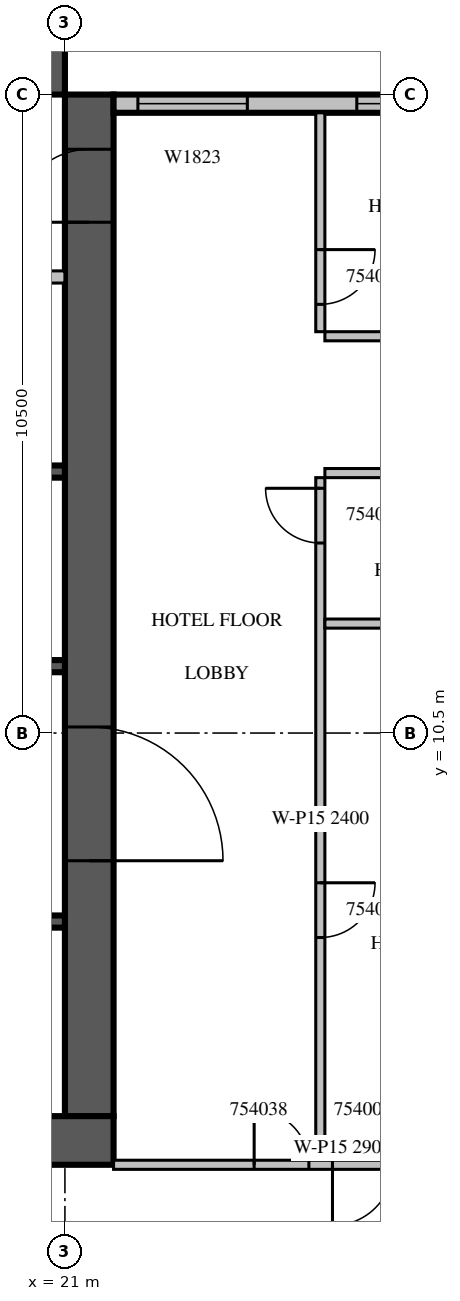
"""IFC4 building model, lengths in metres.
Left out: names, types, materials, properties, quantities, classifications, styles, units other than length and angle.
Written with IfcOpenShell. Run it as: python <this file> out.ifc"""

import sys

from ifc_helpers import new_model, si_unit, direction, frame, frame_2d, origin, place, context, subcontext, project, spatial, rectangle, extrude, source, transform, mapped, element, fill, save


model = new_model("IFC4")
c1 = context("Model", 3, precision=1e-05, world=origin(), true_north=direction((0.0, 1.0)))
c2 = subcontext(c1, "Body", "Model", "MODEL_VIEW")
j1 = project(units=[si_unit("LENGTHUNIT", "METRE"), si_unit("PLANEANGLEUNIT", "RADIAN")], contexts=[c1])
p1 = place(None, origin())
s1 = spatial("IfcSite", under=j1, at=p1, CompositionType="ELEMENT")
p2 = place(p1, origin())
s2 = spatial("IfcBuilding", under=s1, at=p2, CompositionType="ELEMENT")
p3 = place(p2, frame((0.0, 0.0, 238.6)))
s3 = spatial("IfcBuildingStorey", under=s2, at=p3, CompositionType="ELEMENT", Elevation=238.6)
m1 = source(origin(), c2, "Body", "SweptSolid", [
    extrude(rectangle(XDim=16.8, YDim=0.8, at=frame_2d((8.4, 0.0))), origin(), (0.0, 0.0, 1.0), 3.8),
])
p4 = place(p3, frame((21.4, 4.2, 0.0), z_axis=(0.0, 0.0, 1.0), x_axis=(0.0, 1.0, 0.0)))
e1 = element("IfcWall", 1, at=p4, inside=s3, PredefinedType="SHEAR", context=c2, shape_type="MappedRepresentation", body=[
    mapped(m1, transform((0.0, 0.0, 0.0), scale=1.0)),
])
m2 = source(origin(), c2, "Body", "SweptSolid", [
    extrude(rectangle(XDim=2.2, YDim=2.1, at=frame_2d((1.1, 1.05))), frame((0.0, 0.41, 0.0), z_axis=(0.0, -1.0, 0.0), x_axis=(1.0, 0.0, 0.0)), (0.0, 0.0, 1.0), 0.82),
])
p5 = place(p4, frame((4.2, 0.0, 0.0)))
e2 = element("IfcOpeningElement", 2, at=p5, cuts=e1, PredefinedType="OPENING", context=c2, shape_type="MappedRepresentation", body=[
    mapped(m2, transform((0.0, 0.0, 0.0), scale=1.0)),
])
m3 = source(origin(), c2, "Body", "SweptSolid", [
    extrude(rectangle(XDim=1.2, YDim=2.1, at=frame_2d((0.6, 1.05))), frame((0.0, 0.41, 0.0), z_axis=(0.0, -1.0, 0.0), x_axis=(1.0, 0.0, 0.0)), (0.0, 0.0, 1.0), 0.82),
])
p6 = place(p4, frame((14.7, 0.0, 0.0)))
e3 = element("IfcOpeningElement", 3, at=p6, cuts=e1, PredefinedType="OPENING", context=c2, shape_type="MappedRepresentation", body=[
    mapped(m3, transform((0.0, 0.0, 0.0), scale=1.0)),
])
m4 = source(origin(), c2, "Body", "SweptSolid", [
    extrude(rectangle(XDim=17.6, YDim=0.8, at=frame_2d((8.8, 0.0))), origin(), (0.0, 0.0, 1.0), 3.8),
])
p7 = place(p3, frame((4.2, 3.8, 0.0), z_axis=(0.0, 0.0, 1.0), x_axis=(1.0, 0.0, 0.0)))
e4 = element("IfcWall", 4, at=p7, inside=s3, PredefinedType="SHEAR", context=c2, shape_type="MappedRepresentation", body=[
    mapped(m4, transform((0.0, 0.0, 0.0), scale=1.0)),
])
m5 = source(origin(), c2, "Body", "SweptSolid", [
    extrude(rectangle(XDim=0.9, YDim=2.1, at=frame_2d((0.45, 1.05))), frame((0.0, 0.41, 0.0), z_axis=(0.0, -1.0, 0.0), x_axis=(1.0, 0.0, 0.0)), (0.0, 0.0, 1.0), 0.82),
])
p8 = place(p7, frame((12.75, 0.0, 0.0)))
e5 = element("IfcOpeningElement", 5, at=p8, cuts=e4, PredefinedType="OPENING", context=c2, shape_type="MappedRepresentation", body=[
    mapped(m5, transform((0.0, 0.0, 0.0), scale=1.0)),
])
p9 = place(p3, frame((4.2, 21.4, 0.0), z_axis=(0.0, 0.0, 1.0), x_axis=(1.0, 0.0, 0.0)))
e6 = element("IfcWall", 6, at=p9, inside=s3, PredefinedType="SHEAR", context=c2, shape_type="MappedRepresentation", body=[
    mapped(m1, transform((0.0, 0.0, 0.0), scale=1.0)),
])
p10 = place(p9, frame((7.4, 0.0, 0.0)))
e7 = element("IfcOpeningElement", 7, at=p10, cuts=e6, PredefinedType="OPENING", context=c2, shape_type="MappedRepresentation", body=[
    mapped(m3, transform((0.0, 0.0, 0.0), scale=1.0)),
])
m6 = source(origin(), c2, "Body", "SweptSolid", [
    extrude(rectangle(XDim=7.2, YDim=0.3, at=frame_2d((3.6, 0.0))), origin(), (0.0, 0.0, 1.0), 3.4),
])
p11 = place(p3, frame((29.0, 20.85, 0.0), z_axis=(0.0, 0.0, 1.0), x_axis=(-1.0, 0.0, 0.0)))
e8 = element("IfcWall", 8, at=p11, inside=s3, PredefinedType="STANDARD", context=c2, shape_type="MappedRepresentation", body=[
    mapped(m6, transform((0.0, 0.0, 0.0), scale=1.0)),
])
m7 = source(origin(), c2, "Body", "SweptSolid", [
    extrude(rectangle(XDim=3.0, YDim=2.3, at=frame_2d((1.5, 1.15))), frame((0.0, 0.16, 0.0), z_axis=(0.0, -1.0, 0.0), x_axis=(1.0, 0.0, 0.0)), (0.0, 0.0, 1.0), 0.32),
])
p12 = place(p11, frame((0.2, 0.0, 0.6)))
e9 = element("IfcOpeningElement", 9, at=p12, cuts=e8, PredefinedType="OPENING", context=c2, shape_type="MappedRepresentation", body=[
    mapped(m7, transform((0.0, 0.0, 0.0), scale=1.0)),
])
m8 = source(origin(), c2, "Body", "SweptSolid", [
    extrude(rectangle(XDim=1.8, YDim=2.3, at=frame_2d((0.9, 1.15))), frame((0.0, 0.16, 0.0), z_axis=(0.0, -1.0, 0.0), x_axis=(1.0, 0.0, 0.0)), (0.0, 0.0, 1.0), 0.32),
])
p13 = place(p11, frame((5.0, 0.0, 0.6)))
e10 = element("IfcOpeningElement", 10, at=p13, cuts=e8, PredefinedType="OPENING", context=c2, shape_type="MappedRepresentation", body=[
    mapped(m8, transform((0.0, 0.0, 0.0), scale=1.0)),
])
m9 = source(origin(), c2, "Body", "SweptSolid", [
    extrude(rectangle(XDim=2.4, YDim=0.2, at=frame_2d((1.2, 0.0))), origin(), (0.0, 0.0, 1.0), 3.8),
])
p14 = place(p3, frame((18.6, 7.4, 0.0), z_axis=(0.0, 0.0, 1.0), x_axis=(1.0, 0.0, 0.0)))
e11 = element("IfcWall", 11, at=p14, inside=s3, PredefinedType="SOLIDWALL", context=c2, shape_type="MappedRepresentation", body=[
    mapped(m9, transform((0.0, 0.0, 0.0), scale=1.0)),
])
m10 = source(origin(), c2, "Body", "SweptSolid", [
    extrude(rectangle(XDim=9.6, YDim=0.2, at=frame_2d((4.8, 0.0))), origin(), (0.0, 0.0, 1.0), 3.8),
])
p15 = place(p3, frame((11.4, 11.6, 0.0), z_axis=(0.0, 0.0, 1.0), x_axis=(1.0, 0.0, 0.0)))
e12 = element("IfcWall", 12, at=p15, inside=s3, PredefinedType="SOLIDWALL", context=c2, shape_type="MappedRepresentation", body=[
    mapped(m10, transform((0.0, 0.0, 0.0), scale=1.0)),
])
p16 = place(p3, frame((11.4, 14.8, 0.0), z_axis=(0.0, 0.0, 1.0), x_axis=(1.0, 0.0, 0.0)))
e13 = element("IfcWall", 13, at=p16, inside=s3, PredefinedType="SOLIDWALL", context=c2, shape_type="MappedRepresentation", body=[
    mapped(m10, transform((0.0, 0.0, 0.0), scale=1.0)),
])
m11 = source(origin(), c2, "Body", "SweptSolid", [
    extrude(rectangle(XDim=1.1, YDim=2.1, at=frame_2d((0.55, 1.05))), frame((0.0, 0.11, 0.0), z_axis=(0.0, -1.0, 0.0), x_axis=(1.0, 0.0, 0.0)), (0.0, 0.0, 1.0), 0.22),
])
p17 = place(p16, frame((3.05, 0.0, 0.0)))
e14 = element("IfcOpeningElement", 14, at=p17, cuts=e13, PredefinedType="OPENING", context=c2, shape_type="MappedRepresentation", body=[
    mapped(m11, transform((0.0, 0.0, 0.0), scale=1.0)),
])
p18 = place(p16, frame((5.45, 0.0, 0.0)))
e15 = element("IfcOpeningElement", 15, at=p18, cuts=e13, PredefinedType="OPENING", context=c2, shape_type="MappedRepresentation", body=[
    mapped(m11, transform((0.0, 0.0, 0.0), scale=1.0)),
])
p19 = place(p16, frame((7.85, 0.0, 0.0)))
e16 = element("IfcOpeningElement", 16, at=p19, cuts=e13, PredefinedType="OPENING", context=c2, shape_type="MappedRepresentation", body=[
    mapped(m11, transform((0.0, 0.0, 0.0), scale=1.0)),
])
m12 = source(origin(), c2, "Body", "SweptSolid", [
    extrude(rectangle(XDim=11.45, YDim=0.2, at=frame_2d((5.725, 0.0))), origin(), (0.0, 0.0, 1.0), 3.4),
])
p20 = place(p3, frame((9.55, 18.0, 0.0), z_axis=(0.0, 0.0, 1.0), x_axis=(1.0, 0.0, 0.0)))
e17 = element("IfcWall", 17, at=p20, inside=s3, PredefinedType="PARTITIONING", context=c2, shape_type="MappedRepresentation", body=[
    mapped(m12, transform((0.0, 0.0, 0.0), scale=1.0)),
])
m13 = source(origin(), c2, "Body", "SweptSolid", [
    extrude(rectangle(XDim=0.9, YDim=2.1, at=frame_2d((0.45, 1.05))), frame((0.0, 0.11, 0.0), z_axis=(0.0, -1.0, 0.0), x_axis=(1.0, 0.0, 0.0)), (0.0, 0.0, 1.0), 0.22),
])
p21 = place(p20, frame((0.475, 0.0, 0.0)))
e18 = element("IfcOpeningElement", 18, at=p21, cuts=e17, PredefinedType="OPENING", context=c2, shape_type="MappedRepresentation", body=[
    mapped(m13, transform((0.0, 0.0, 0.0), scale=1.0)),
])
p22 = place(p20, frame((1.85, 0.0, 0.0)))
e19 = element("IfcOpeningElement", 19, at=p22, cuts=e17, PredefinedType="OPENING", context=c2, shape_type="MappedRepresentation", body=[
    mapped(m13, transform((0.0, 0.0, 0.0), scale=1.0)),
])
p23 = place(p20, frame((3.125, 0.0, 0.0)))
e20 = element("IfcOpeningElement", 20, at=p23, cuts=e17, PredefinedType="OPENING", context=c2, shape_type="MappedRepresentation", body=[
    mapped(m13, transform((0.0, 0.0, 0.0), scale=1.0)),
])
p24 = place(p20, frame((7.35, 0.0, 0.0)))
e21 = element("IfcOpeningElement", 21, at=p24, cuts=e17, PredefinedType="OPENING", context=c2, shape_type="MappedRepresentation", body=[
    mapped(m11, transform((0.0, 0.0, 0.0), scale=1.0)),
])
m14 = source(origin(), c2, "Body", "SweptSolid", [
    extrude(rectangle(XDim=11.225, YDim=0.15, at=frame_2d((5.612, 0.0))), origin(), (0.0, 0.0, 1.0), 2.4),
])
p25 = place(p3, frame((25.2, 14.7, 0.0), z_axis=(0.0, 0.0, 1.0), x_axis=(0.0, -1.0, 0.0)))
e22 = element("IfcWall", 22, at=p25, inside=s3, PredefinedType="PARTITIONING", context=c2, shape_type="MappedRepresentation", body=[
    mapped(m14, transform((0.0, 0.0, 0.0), scale=1.0)),
])
m15 = source(origin(), c2, "Body", "SweptSolid", [
    extrude(rectangle(XDim=0.9, YDim=2.1, at=frame_2d((0.45, 1.05))), frame((0.0, 0.085, 0.0), z_axis=(0.0, -1.0, 0.0), x_axis=(1.0, 0.0, 0.0)), (0.0, 0.0, 1.0), 0.17),
])
p26 = place(p25, frame((6.662, 0.0, 0.0)))
e23 = element("IfcOpeningElement", 23, at=p26, cuts=e22, PredefinedType="OPENING", context=c2, shape_type="MappedRepresentation", body=[
    mapped(m15, transform((0.0, 0.0, 0.0), scale=1.0)),
])
p27 = place(p25, frame((0.175, 0.0, 0.0)))
e24 = element("IfcOpeningElement", 24, at=p27, cuts=e22, PredefinedType="OPENING", context=c2, shape_type="MappedRepresentation", body=[
    mapped(m15, transform((0.0, 0.0, 0.0), scale=1.0)),
])
m16 = source(origin(), c2, "Body", "SweptSolid", [
    extrude(rectangle(XDim=3.6, YDim=0.15, at=frame_2d((1.8, 0.0))), origin(), (0.0, 0.0, 1.0), 3.4),
])
p28 = place(p3, frame((25.2, 20.7, 0.0), z_axis=(0.0, 0.0, 1.0), x_axis=(0.0, -1.0, 0.0)))
e25 = element("IfcWall", 25, at=p28, inside=s3, PredefinedType="PARTITIONING", context=c2, shape_type="MappedRepresentation", body=[
    mapped(m16, transform((0.0, 0.0, 0.0), scale=1.0)),
])
p29 = place(p28, frame((2.25, 0.0, 0.0)))
e26 = element("IfcOpeningElement", 26, at=p29, cuts=e25, PredefinedType="OPENING", context=c2, shape_type="MappedRepresentation", body=[
    mapped(m15, transform((0.0, 0.0, 0.0), scale=1.0)),
])
m17 = source(origin(), c2, "Body", "SweptSolid", [
    extrude(rectangle(XDim=4.05, YDim=0.15, at=frame_2d((2.025, 0.0))), origin(), (0.0, 0.0, 1.0), 3.4),
])
for number, where, z_axis, x_axis in (
    (27, (29.325, 12.3, 0.0), (0.0, 0.0, 1.0), (-1.0, 0.0, 0.0)),
    (28, (29.325, 14.775, 0.0), (0.0, 0.0, 1.0), (-1.0, 0.0, 0.0)),
    (29, (25.275, 17.025, 0.0), (0.0, 0.0, 1.0), (1.0, 0.0, 0.0)),
):
    element("IfcWall", number, at=place(p3, frame(where, z_axis=z_axis, x_axis=x_axis)), inside=s3, PredefinedType="PARTITIONING", context=c2, shape_type="MappedRepresentation", body=[
        mapped(m17, transform((0.0, 0.0, 0.0), scale=1.0)),
    ])
m18 = source(origin(), c2, "Body", "SweptSolid", [
    extrude(rectangle(XDim=7.525, YDim=0.15, at=frame_2d((3.763, 0.0))), origin(), (0.0, 0.0, 1.0), 2.9),
])
p30 = place(p3, frame((21.8, 3.4, 0.0), z_axis=(0.0, 0.0, 1.0), x_axis=(1.0, 0.0, 0.0)))
e30 = element("IfcWall", 30, at=p30, inside=s3, PredefinedType="PARTITIONING", context=c2, shape_type="MappedRepresentation", body=[
    mapped(m18, transform((0.0, 0.0, 0.0), scale=1.0)),
])
m19 = source(origin(), c2, "Body", "SweptSolid", [
    extrude(rectangle(XDim=1.0, YDim=2.1, at=frame_2d((0.5, 1.05))), frame((0.0, 0.085, 0.0), z_axis=(0.0, -1.0, 0.0), x_axis=(1.0, 0.0, 0.0)), (0.0, 0.0, 1.0), 0.17),
])
p31 = place(p30, frame((3.6, 0.0, 0.0)))
e31 = element("IfcOpeningElement", 31, at=p31, cuts=e30, PredefinedType="OPENING", context=c2, shape_type="MappedRepresentation", body=[
    mapped(m19, transform((0.0, 0.0, 0.0), scale=1.0)),
])
p32 = place(p30, frame((2.312, 0.0, 0.0)))
e32 = element("IfcOpeningElement", 32, at=p32, cuts=e30, PredefinedType="OPENING", context=c2, shape_type="MappedRepresentation", body=[
    mapped(m15, transform((0.0, 0.0, 0.0), scale=1.0)),
])
m20 = source(origin(), c2, "Body", "SweptSolid", [
    extrude(rectangle(XDim=3.0, YDim=2.3, at=frame_2d((1.5, 1.15))), frame((0.0, 0.03, 0.0), z_axis=(0.0, -1.0, 0.0), x_axis=(1.0, 0.0, 0.0)), (0.0, 0.0, 1.0), 0.06),
])
p33 = place(p12, origin())
e33 = element("IfcWindow", 33, at=p33, inside=s3, PartitioningType="SINGLE_PANEL", PredefinedType="WINDOW", context=c2, shape_type="MappedRepresentation", body=[
    mapped(m20, transform((0.0, 0.0, 0.0), scale=1.0)),
])
fill(e9, e33)
m21 = source(origin(), c2, "Body", "SweptSolid", [
    extrude(rectangle(XDim=1.8, YDim=2.3, at=frame_2d((0.9, 1.15))), frame((0.0, 0.03, 0.0), z_axis=(0.0, -1.0, 0.0), x_axis=(1.0, 0.0, 0.0)), (0.0, 0.0, 1.0), 0.06),
])
p34 = place(p13, origin())
e34 = element("IfcWindow", 34, at=p34, inside=s3, PartitioningType="SINGLE_PANEL", PredefinedType="WINDOW", context=c2, shape_type="MappedRepresentation", body=[
    mapped(m21, transform((0.0, 0.0, 0.0), scale=1.0)),
])
fill(e10, e34)
m22 = source(origin(), c2, "Body", "SweptSolid", [
    extrude(rectangle(XDim=2.2, YDim=2.1, at=frame_2d((1.1, 1.05))), frame((0.0, 0.025, 0.0), z_axis=(0.0, -1.0, 0.0), x_axis=(1.0, 0.0, 0.0)), (0.0, 0.0, 1.0), 0.05),
])
p35 = place(p5, origin())
e35 = element("IfcDoor", 35, at=p35, inside=s3, OperationType="DOUBLE_DOOR_SINGLE_SWING", PredefinedType="DOOR", context=c2, shape_type="MappedRepresentation", body=[
    mapped(m22, transform((0.0, 0.0, 0.0), scale=1.0)),
])
fill(e2, e35)
m23 = source(origin(), c2, "Body", "SweptSolid", [
    extrude(rectangle(XDim=1.2, YDim=2.1, at=frame_2d((0.6, 1.05))), frame((0.0, 0.025, 0.0), z_axis=(0.0, -1.0, 0.0), x_axis=(1.0, 0.0, 0.0)), (0.0, 0.0, 1.0), 0.05),
])
p36 = place(p6, origin())
e36 = element("IfcDoor", 36, at=p36, inside=s3, OperationType="SINGLE_SWING_LEFT", PredefinedType="DOOR", context=c2, shape_type="MappedRepresentation", body=[
    mapped(m23, transform((0.0, 0.0, 0.0), scale=1.0)),
])
fill(e3, e36)
m24 = source(origin(), c2, "Body", "SweptSolid", [
    extrude(rectangle(XDim=0.9, YDim=2.1, at=frame_2d((0.45, 1.05))), frame((0.0, 0.025, 0.0), z_axis=(0.0, -1.0, 0.0), x_axis=(1.0, 0.0, 0.0)), (0.0, 0.0, 1.0), 0.05),
])
p37 = place(p26, origin())
e37 = element("IfcDoor", 37, at=p37, inside=s3, OperationType="SINGLE_SWING_LEFT", PredefinedType="DOOR", context=c2, shape_type="MappedRepresentation", body=[
    mapped(m24, transform((0.0, 0.0, 0.0), scale=1.0)),
])
fill(e23, e37)
p38 = place(p27, origin())
e38 = element("IfcDoor", 38, at=p38, inside=s3, OperationType="SINGLE_SWING_RIGHT", PredefinedType="DOOR", context=c2, shape_type="MappedRepresentation", body=[
    mapped(m24, transform((0.0, 0.0, 0.0), scale=1.0)),
])
fill(e24, e38)
p39 = place(p29, origin())
e39 = element("IfcDoor", 39, at=p39, inside=s3, OperationType="SINGLE_SWING_LEFT", PredefinedType="DOOR", context=c2, shape_type="MappedRepresentation", body=[
    mapped(m24, transform((0.0, 0.0, 0.0), scale=1.0)),
])
fill(e26, e39)
m25 = source(origin(), c2, "Body", "SweptSolid", [
    extrude(rectangle(XDim=1.0, YDim=2.1, at=frame_2d((0.5, 1.05))), frame((0.0, 0.025, 0.0), z_axis=(0.0, -1.0, 0.0), x_axis=(1.0, 0.0, 0.0)), (0.0, 0.0, 1.0), 0.05),
])
p40 = place(p31, origin())
e40 = element("IfcDoor", 40, at=p40, inside=s3, OperationType="SINGLE_SWING_RIGHT", PredefinedType="DOOR", context=c2, shape_type="MappedRepresentation", body=[
    mapped(m25, transform((0.0, 0.0, 0.0), scale=1.0)),
])
fill(e31, e40)
p41 = place(p32, origin())
e41 = element("IfcDoor", 41, at=p41, inside=s3, OperationType="SINGLE_SWING_LEFT", PredefinedType="DOOR", context=c2, shape_type="MappedRepresentation", body=[
    mapped(m24, transform((0.0, 0.0, 0.0), scale=1.0)),
])
fill(e32, e41)
save(model, sys.argv[1])
